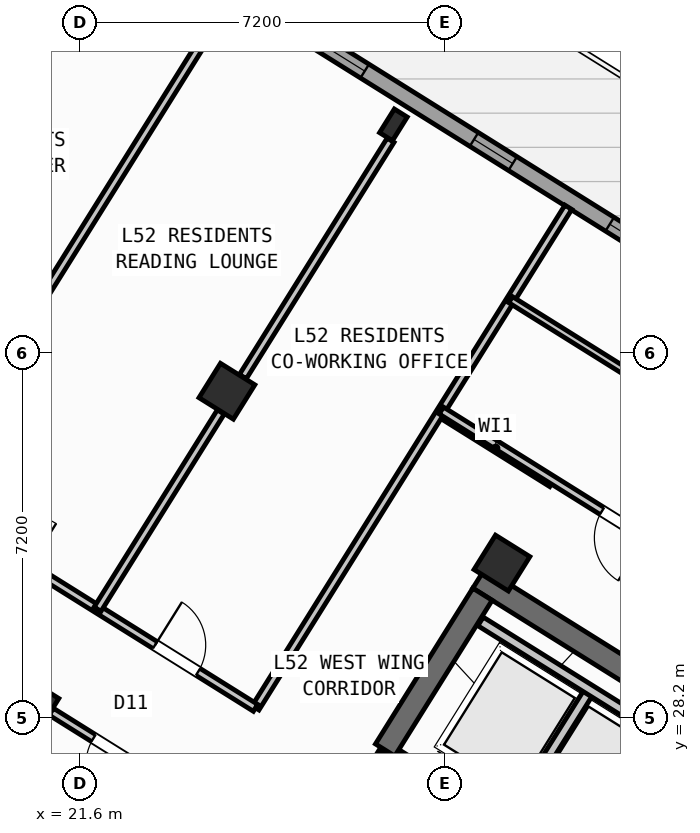
"""IFC4 building model, lengths in metres.
Left out: names, types, materials, properties, quantities, classifications, styles, units other than length and angle.
Written with IfcOpenShell. Run it as: python <this file> out.ifc"""

import sys

from ifc_helpers import new_model, si_unit, direction, frame, frame_2d, origin, origin_2d, place, context, subcontext, project, spatial, rectangle, hollow_rectangle, i_section, extrude, source, transform, mapped, element, fill, save


model = new_model("IFC4")
c1 = context("Model", 3, precision=1e-05, world=origin(), true_north=direction((0.0, 1.0)))
c2 = subcontext(c1, "Body", "Model", "MODEL_VIEW")
j1 = project(units=[si_unit("LENGTHUNIT", "METRE"), si_unit("PLANEANGLEUNIT", "RADIAN")], contexts=[c1])
p1 = place(None, origin())
s1 = spatial("IfcSite", under=j1, at=p1, CompositionType="ELEMENT")
p2 = place(p1, origin())
s2 = spatial("IfcBuilding", under=s1, at=p2, CompositionType="ELEMENT")
p3 = place(p2, frame((0.0, 0.0, 207.6)))
s3 = spatial("IfcBuildingStorey", under=s2, at=p3, CompositionType="ELEMENT", Elevation=207.6)
p4 = place(p3, frame((40.531, 24.036, 0.0), z_axis=(0.0, 0.0, 1.0), x_axis=(-0.848048787466, 0.529918157905, 0.0)))
e1 = element("IfcWall", 1, at=p4, inside=s3, PredefinedType="SHEAR", context=c2, shape_type="SweptSolid", body=[
    extrude(rectangle(XDim=13.04, YDim=0.45, at=frame_2d((6.52, 0.0))), origin(), (0.0, 0.0, 1.0), 3.35),
])
p5 = place(p3, frame((29.544, 30.636, 0.0), z_axis=(0.0, 0.0, 1.0), x_axis=(-0.529902075036, -0.848058836916, 0.0)))
e2 = element("IfcWall", 2, at=p5, inside=s3, PredefinedType="SHEAR", context=c2, shape_type="SweptSolid", body=[
    extrude(rectangle(XDim=3.625, YDim=0.45, at=frame_2d((1.812, 0.0))), origin(), (0.0, 0.0, 1.0), 3.35),
])
m1 = source(origin(), c2, "Body", "SweptSolid", [
    extrude(hollow_rectangle(XDim=0.8, YDim=0.8, WallThickness=0.032, at=origin_2d()), origin(), (0.0, 0.0, 1.0), 3.6),
])
p6 = place(p3, frame((29.928, 31.251, 0.0), z_axis=(0.0, 0.0, 1.0), x_axis=(-0.848048096156, 0.529919264233, 0.0)))
e3 = element("IfcColumn", 3, at=p6, inside=s3, PredefinedType="COLUMN", context=c2, shape_type="MappedRepresentation", body=[
    mapped(m1, transform((0.0, 0.0, 0.0), scale=1.0)),
])
m2 = source(origin(), c2, "Body", "SweptSolid", [
    extrude(i_section(OverallWidth=0.3, OverallDepth=0.55, WebThickness=0.015, FlangeThickness=0.029, at=origin_2d()), origin(), (0.0, 0.0, 1.0), 3.6),
])
p7 = place(p3, frame((27.786, 39.901, 0.0), z_axis=(0.0, 0.0, 1.0), x_axis=(-0.848048096156, 0.529919264233, 0.0)))
e4 = element("IfcColumn", 4, at=p7, inside=s3, PredefinedType="COLUMN", context=c2, shape_type="MappedRepresentation", body=[
    mapped(m2, transform((0.0, 0.0, 0.0), scale=1.0)),
])
for number, where, z_axis, x_axis in (
    (5, (24.5, 34.643, 0.0), (0.0, 0.0, 1.0), (-0.848, 0.53, 0.0)),
    (6, (20.632, 28.452, 0.0), (0.0, 0.0, 1.0), (-0.848, 0.53, 0.0)),
):
    element("IfcColumn", number, at=place(p3, frame(where, z_axis=z_axis, x_axis=x_axis)), inside=s3, PredefinedType="COLUMN", context=c2, shape_type="MappedRepresentation", body=[
        mapped(m1, transform((0.0, 0.0, 0.0), scale=1.0)),
    ])
p8 = place(p3, frame((31.76, 12.183, 0.0), z_axis=(0.0, 0.0, 1.0), x_axis=(-0.848047074256, 0.529920899612, 0.0)))
e7 = element("IfcWall", 7, at=p8, inside=s3, PredefinedType="STANDARD", context=c2, shape_type="SweptSolid", body=[
    extrude(rectangle(XDim=30.652, YDim=0.32, at=frame_2d((15.326, 0.0))), origin(), (0.0, 0.0, 1.0), 3.35),
])
p9 = place(p8, frame((15.166, 0.0, 0.0)))
e8 = element("IfcOpeningElement", 8, at=p9, cuts=e7, PredefinedType="OPENING", context=c2, shape_type="SweptSolid", body=[
    extrude(rectangle(XDim=1.2, YDim=2.15, at=frame_2d((0.6, 1.075))), frame((0.0, 0.17, 0.0), z_axis=(0.0, -1.0, 0.0), x_axis=(1.0, 0.0, 0.0)), (0.0, 0.0, 1.0), 0.34),
])
p10 = place(p8, frame((2.24, 0.0, 0.9)))
e9 = element("IfcOpeningElement", 9, at=p10, cuts=e7, PredefinedType="OPENING", context=c2, shape_type="SweptSolid", body=[
    extrude(rectangle(XDim=1.65, YDim=1.45, at=frame_2d((0.825, 0.725))), frame((0.0, 0.17, 0.0), z_axis=(0.0, -1.0, 0.0), x_axis=(1.0, 0.0, 0.0)), (0.0, 0.0, 1.0), 0.34),
])
p11 = place(p8, frame((7.469, 0.0, 0.9)))
e10 = element("IfcOpeningElement", 10, at=p11, cuts=e7, PredefinedType="OPENING", context=c2, shape_type="SweptSolid", body=[
    extrude(rectangle(XDim=1.65, YDim=1.45, at=frame_2d((0.825, 0.725))), frame((0.0, 0.17, 0.0), z_axis=(0.0, -1.0, 0.0), x_axis=(1.0, 0.0, 0.0)), (0.0, 0.0, 1.0), 0.34),
])
p12 = place(p8, frame((12.623, 0.0, 1.0)))
e11 = element("IfcOpeningElement", 11, at=p12, cuts=e7, PredefinedType="OPENING", context=c2, shape_type="SweptSolid", body=[
    extrude(rectangle(XDim=0.9, YDim=1.25, at=frame_2d((0.45, 0.625))), frame((0.0, 0.17, 0.0), z_axis=(0.0, -1.0, 0.0), x_axis=(1.0, 0.0, 0.0)), (0.0, 0.0, 1.0), 0.34),
])
p13 = place(p8, frame((19.715, 0.0, 1.0)))
e12 = element("IfcOpeningElement", 12, at=p13, cuts=e7, PredefinedType="OPENING", context=c2, shape_type="SweptSolid", body=[
    extrude(rectangle(XDim=0.9, YDim=1.25, at=frame_2d((0.45, 0.625))), frame((0.0, 0.17, 0.0), z_axis=(0.0, -1.0, 0.0), x_axis=(1.0, 0.0, 0.0)), (0.0, 0.0, 1.0), 0.34),
])
p14 = place(p8, frame((25.566, 0.0, 0.9)))
e13 = element("IfcOpeningElement", 13, at=p14, cuts=e7, PredefinedType="OPENING", context=c2, shape_type="SweptSolid", body=[
    extrude(rectangle(XDim=1.65, YDim=1.45, at=frame_2d((0.825, 0.725))), frame((0.0, 0.17, 0.0), z_axis=(0.0, -1.0, 0.0), x_axis=(1.0, 0.0, 0.0)), (0.0, 0.0, 1.0), 0.34),
])
p15 = place(p8, frame((28.896, 0.0, 1.0)))
e14 = element("IfcOpeningElement", 14, at=p15, cuts=e7, PredefinedType="OPENING", context=c2, shape_type="SweptSolid", body=[
    extrude(rectangle(XDim=0.9, YDim=1.25, at=frame_2d((0.45, 0.625))), frame((0.0, 0.17, 0.0), z_axis=(0.0, -1.0, 0.0), x_axis=(1.0, 0.0, 0.0)), (0.0, 0.0, 1.0), 0.34),
])
p16 = place(p3, frame((17.424, 47.083, 0.0), z_axis=(0.0, 0.0, 1.0), x_axis=(0.848049927979, -0.529916332693, 0.0)))
e15 = element("IfcWall", 15, at=p16, inside=s3, PredefinedType="STANDARD", context=c2, shape_type="SweptSolid", body=[
    extrude(rectangle(XDim=29.223, YDim=0.32, at=frame_2d((14.612, 0.0))), origin(), (0.0, 0.0, 1.0), 3.35),
])
p17 = place(p16, frame((2.526, 0.0, 0.0)))
e16 = element("IfcOpeningElement", 16, at=p17, cuts=e15, PredefinedType="OPENING", context=c2, shape_type="SweptSolid", body=[
    extrude(rectangle(XDim=1.05, YDim=2.15, at=frame_2d((0.525, 1.075))), frame((0.0, 0.17, 0.0), z_axis=(0.0, -1.0, 0.0), x_axis=(1.0, 0.0, 0.0)), (0.0, 0.0, 1.0), 0.34),
])
p18 = place(p16, frame((0.653, 0.0, 0.9)))
e17 = element("IfcOpeningElement", 17, at=p18, cuts=e15, PredefinedType="OPENING", context=c2, shape_type="SweptSolid", body=[
    extrude(rectangle(XDim=1.35, YDim=1.45, at=frame_2d((0.675, 0.725))), frame((0.0, 0.17, 0.0), z_axis=(0.0, -1.0, 0.0), x_axis=(1.0, 0.0, 0.0)), (0.0, 0.0, 1.0), 0.34),
])
p19 = place(p16, frame((6.897, 0.0, 1.0)))
e18 = element("IfcOpeningElement", 18, at=p19, cuts=e15, PredefinedType="OPENING", context=c2, shape_type="SweptSolid", body=[
    extrude(rectangle(XDim=0.9, YDim=1.25, at=frame_2d((0.45, 0.625))), frame((0.0, 0.17, 0.0), z_axis=(0.0, -1.0, 0.0), x_axis=(1.0, 0.0, 0.0)), (0.0, 0.0, 1.0), 0.34),
])
p20 = place(p16, frame((9.602, 0.0, 0.95)))
e19 = element("IfcOpeningElement", 19, at=p20, cuts=e15, PredefinedType="OPENING", context=c2, shape_type="SweptSolid", body=[
    extrude(rectangle(XDim=1.95, YDim=1.35, at=frame_2d((0.975, 0.675))), frame((0.0, 0.17, 0.0), z_axis=(0.0, -1.0, 0.0), x_axis=(1.0, 0.0, 0.0)), (0.0, 0.0, 1.0), 0.34),
])
p21 = place(p16, frame((14.096, 0.0, 1.0)))
e20 = element("IfcOpeningElement", 20, at=p21, cuts=e15, PredefinedType="OPENING", context=c2, shape_type="SweptSolid", body=[
    extrude(rectangle(XDim=0.9, YDim=1.25, at=frame_2d((0.45, 0.625))), frame((0.0, 0.17, 0.0), z_axis=(0.0, -1.0, 0.0), x_axis=(1.0, 0.0, 0.0)), (0.0, 0.0, 1.0), 0.34),
])
p22 = place(p16, frame((17.254, 0.0, 1.0)))
e21 = element("IfcOpeningElement", 21, at=p22, cuts=e15, PredefinedType="OPENING", context=c2, shape_type="SweptSolid", body=[
    extrude(rectangle(XDim=0.9, YDim=1.25, at=frame_2d((0.45, 0.625))), frame((0.0, 0.17, 0.0), z_axis=(0.0, -1.0, 0.0), x_axis=(1.0, 0.0, 0.0)), (0.0, 0.0, 1.0), 0.34),
])
p23 = place(p16, frame((21.139, 0.0, 0.9)))
e22 = element("IfcOpeningElement", 22, at=p23, cuts=e15, PredefinedType="OPENING", context=c2, shape_type="SweptSolid", body=[
    extrude(rectangle(XDim=1.35, YDim=1.45, at=frame_2d((0.675, 0.725))), frame((0.0, 0.17, 0.0), z_axis=(0.0, -1.0, 0.0), x_axis=(1.0, 0.0, 0.0)), (0.0, 0.0, 1.0), 0.34),
])
p24 = place(p16, frame((25.778, 0.0, 0.9)))
e23 = element("IfcOpeningElement", 23, at=p24, cuts=e15, PredefinedType="OPENING", context=c2, shape_type="SweptSolid", body=[
    extrude(rectangle(XDim=1.35, YDim=1.45, at=frame_2d((0.675, 0.725))), frame((0.0, 0.17, 0.0), z_axis=(0.0, -1.0, 0.0), x_axis=(1.0, 0.0, 0.0)), (0.0, 0.0, 1.0), 0.34),
])
p25 = place(p3, frame((33.496, 27.677, 0.0), z_axis=(0.0, 0.0, 1.0), x_axis=(-0.529908658664, -0.84805472316, 0.0)))
e24 = element("IfcWall", 24, at=p25, inside=s3, PredefinedType="SHEAR", context=c2, shape_type="SweptSolid", body=[
    extrude(rectangle(XDim=3.16, YDim=0.26, at=frame_2d((1.58, 0.0))), origin(), (0.0, 0.0, 1.0), 3.35),
])
p26 = place(p3, frame((31.822, 24.998, 0.0), z_axis=(0.0, 0.0, 1.0), x_axis=(-0.848054125777, 0.529909614701, 0.0)))
e25 = element("IfcWall", 25, at=p26, inside=s3, PredefinedType="STANDARD", context=c2, shape_type="SweptSolid", body=[
    extrude(rectangle(XDim=4.668, YDim=0.2, at=frame_2d((2.334, 0.0))), origin(), (0.0, 0.0, 1.0), 3.34),
])
p27 = place(p26, frame((0.52, 0.0, 0.0)))
e26 = element("IfcOpeningElement", 26, at=p27, cuts=e25, PredefinedType="OPENING", context=c2, shape_type="SweptSolid", body=[
    extrude(rectangle(XDim=1.2, YDim=2.15, at=frame_2d((0.6, 1.075))), frame((0.0, 0.11, 0.0), z_axis=(0.0, -1.0, 0.0), x_axis=(1.0, 0.0, 0.0)), (0.0, 0.0, 1.0), 0.22),
])
p28 = place(p26, frame((2.54, 0.0, 0.0)))
e27 = element("IfcOpeningElement", 27, at=p28, cuts=e25, PredefinedType="OPENING", context=c2, shape_type="SweptSolid", body=[
    extrude(rectangle(XDim=1.2, YDim=2.15, at=frame_2d((0.6, 1.075))), frame((0.0, 0.11, 0.0), z_axis=(0.0, -1.0, 0.0), x_axis=(1.0, 0.0, 0.0)), (0.0, 0.0, 1.0), 0.22),
])
p29 = place(p3, frame((31.645, 28.716, 0.0), z_axis=(0.0, 0.0, 1.0), x_axis=(-0.52986693015, -0.848080795876, 0.0)))
e28 = element("IfcWall", 28, at=p29, inside=s3, PredefinedType="STANDARD", context=c2, shape_type="SweptSolid", body=[
    extrude(rectangle(XDim=2.66, YDim=0.2, at=frame_2d((1.33, 0.0))), origin(), (0.0, 0.0, 1.0), 3.34),
])
p30 = place(p3, frame((33.363, 27.69, 0.0), z_axis=(0.0, 0.0, 1.0), x_axis=(-0.84804957148, 0.529916903215, 0.0)))
e29 = element("IfcWall", 29, at=p30, inside=s3, PredefinedType="STANDARD", context=c2, shape_type="SweptSolid", body=[
    extrude(rectangle(XDim=4.548, YDim=0.2, at=frame_2d((2.274, 0.0))), origin(), (0.0, 0.0, 1.0), 3.34),
])
p31 = place(p3, frame((27.596, 27.52, 0.0), z_axis=(0.0, 0.0, 1.0), x_axis=(-0.529865479138, -0.848081702443, 0.0)))
e30 = element("IfcWall", 30, at=p31, inside=s3, PredefinedType="STANDARD", context=c2, shape_type="SweptSolid", body=[
    extrude(rectangle(XDim=2.96, YDim=0.2, at=frame_2d((1.48, 0.0))), origin(), (0.0, 0.0, 1.0), 3.34),
])
p32 = place(p31, frame((0.7, 0.0, 0.0)))
e31 = element("IfcOpeningElement", 31, at=p32, cuts=e30, PredefinedType="OPENING", context=c2, shape_type="SweptSolid", body=[
    extrude(rectangle(XDim=1.5, YDim=2.15, at=frame_2d((0.75, 1.075))), frame((0.0, 0.11, 0.0), z_axis=(0.0, -1.0, 0.0), x_axis=(1.0, 0.0, 0.0)), (0.0, 0.0, 1.0), 0.22),
])
p33 = place(p3, frame((30.914, 32.829, 0.0), z_axis=(0.0, 0.0, 1.0), x_axis=(-0.848008813643, 0.529982124211, 0.0)))
e32 = element("IfcWall", 32, at=p33, inside=s3, PredefinedType="PARTITIONING", context=c2, shape_type="SweptSolid", body=[
    extrude(rectangle(XDim=2.61, YDim=0.16, at=frame_2d((1.305, 0.0))), origin(), (0.0, 0.0, 1.0), 3.34),
])
p34 = place(p3, frame((31.239, 38.274, 0.0), z_axis=(0.0, 0.0, 1.0), x_axis=(-0.529925472745, -0.848044216616, 0.0)))
e33 = element("IfcWall", 33, at=p34, inside=s3, PredefinedType="PARTITIONING", context=c2, shape_type="SweptSolid", body=[
    extrude(rectangle(XDim=11.65, YDim=0.16, at=frame_2d((5.825, 0.0))), origin(), (0.0, 0.0, 1.0), 3.34),
])
p35 = place(p3, frame((25.065, 28.394, 0.0), z_axis=(0.0, 0.0, 1.0), x_axis=(-0.848048310262, 0.529918921593, 0.0)))
e34 = element("IfcWall", 34, at=p35, inside=s3, PredefinedType="PARTITIONING", context=c2, shape_type="SweptSolid", body=[
    extrude(rectangle(XDim=16.73, YDim=0.16, at=frame_2d((8.365, 0.0))), origin(), (0.0, 0.0, 1.0), 3.34),
])
p36 = place(p35, frame((1.338, 0.0, 0.0)))
e35 = element("IfcOpeningElement", 35, at=p36, cuts=e34, PredefinedType="OPENING", context=c2, shape_type="SweptSolid", body=[
    extrude(rectangle(XDim=1.0, YDim=2.1, at=frame_2d((0.5, 1.05))), frame((0.0, 0.09, 0.0), z_axis=(0.0, -1.0, 0.0), x_axis=(1.0, 0.0, 0.0)), (0.0, 0.0, 1.0), 0.18),
])
p37 = place(p35, frame((5.265, 0.0, 0.0)))
e36 = element("IfcOpeningElement", 36, at=p37, cuts=e34, PredefinedType="OPENING", context=c2, shape_type="SweptSolid", body=[
    extrude(rectangle(XDim=1.0, YDim=2.1, at=frame_2d((0.5, 1.05))), frame((0.0, 0.09, 0.0), z_axis=(0.0, -1.0, 0.0), x_axis=(1.0, 0.0, 0.0)), (0.0, 0.0, 1.0), 0.18),
])
p38 = place(p35, frame((9.526, 0.0, 0.0)))
e37 = element("IfcOpeningElement", 37, at=p38, cuts=e34, PredefinedType="OPENING", context=c2, shape_type="SweptSolid", body=[
    extrude(rectangle(XDim=1.0, YDim=2.1, at=frame_2d((0.5, 1.05))), frame((0.0, 0.09, 0.0), z_axis=(0.0, -1.0, 0.0), x_axis=(1.0, 0.0, 0.0)), (0.0, 0.0, 1.0), 0.18),
])
p39 = place(p35, frame((13.954, 0.0, 0.0)))
e38 = element("IfcOpeningElement", 38, at=p39, cuts=e34, PredefinedType="OPENING", context=c2, shape_type="SweptSolid", body=[
    extrude(rectangle(XDim=1.0, YDim=2.1, at=frame_2d((0.5, 1.05))), frame((0.0, 0.09, 0.0), z_axis=(0.0, -1.0, 0.0), x_axis=(1.0, 0.0, 0.0)), (0.0, 0.0, 1.0), 0.18),
])
p40 = place(p3, frame((23.899, 26.529, 0.0), z_axis=(0.0, 0.0, 1.0), x_axis=(-0.848055143312, 0.529907986259, 0.0)))
e39 = element("IfcWall", 39, at=p40, inside=s3, PredefinedType="PARTITIONING", context=c2, shape_type="SweptSolid", body=[
    extrude(rectangle(XDim=3.378, YDim=0.16, at=frame_2d((1.689, 0.0))), origin(), (0.0, 0.0, 1.0), 2.825),
])
p41 = place(p40, frame((1.395, 0.0, 0.0)))
e40 = element("IfcOpeningElement", 40, at=p41, cuts=e39, PredefinedType="OPENING", context=c2, shape_type="SweptSolid", body=[
    extrude(rectangle(XDim=1.0, YDim=2.1, at=frame_2d((0.5, 1.05))), frame((0.0, 0.09, 0.0), z_axis=(0.0, -1.0, 0.0), x_axis=(1.0, 0.0, 0.0)), (0.0, 0.0, 1.0), 0.18),
])
p42 = place(p3, frame((27.73, 39.597, 0.0), z_axis=(0.0, 0.0, 1.0), x_axis=(-0.529919150083, -0.848048167486, 0.0)))
e41 = element("IfcWall", 41, at=p42, inside=s3, PredefinedType="PARTITIONING", context=c2, shape_type="SweptSolid", body=[
    extrude(rectangle(XDim=5.501, YDim=0.16, at=frame_2d((2.75, 0.0))), origin(), (0.0, 0.0, 1.0), 2.825),
])
p43 = place(p3, frame((24.379, 34.233, 0.0), z_axis=(0.0, 0.0, 1.0), x_axis=(-0.529922402838, -0.84804613493, 0.0)))
e42 = element("IfcWall", 42, at=p43, inside=s3, PredefinedType="PARTITIONING", context=c2, shape_type="SweptSolid", body=[
    extrude(rectangle(XDim=4.588, YDim=0.16, at=frame_2d((2.294, 0.0))), origin(), (0.0, 0.0, 1.0), 2.825),
])
p44 = place(p3, frame((24.578, 42.436, 0.0), z_axis=(0.0, 0.0, 1.0), x_axis=(-0.529916055051, -0.848050101468, 0.0)))
e43 = element("IfcWall", 43, at=p44, inside=s3, PredefinedType="PARTITIONING", context=c2, shape_type="SweptSolid", body=[
    extrude(rectangle(XDim=11.65, YDim=0.16, at=frame_2d((5.825, 0.0))), origin(), (0.0, 0.0, 1.0), 2.995),
])
p45 = place(p3, frame((41.936, 26.012, 0.0), z_axis=(0.0, 0.0, 1.0), x_axis=(-0.848051154596, 0.529914369676, 0.0)))
e44 = element("IfcWall", 44, at=p45, inside=s3, PredefinedType="PARTITIONING", context=c2, shape_type="SweptSolid", body=[
    extrude(rectangle(XDim=15.57, YDim=0.16, at=frame_2d((7.785, 0.0))), origin(), (0.0, 0.0, 1.0), 3.34),
])
p46 = place(p45, frame((10.83, 0.0, 0.0)))
e45 = element("IfcOpeningElement", 45, at=p46, cuts=e44, PredefinedType="OPENING", context=c2, shape_type="SweptSolid", body=[
    extrude(rectangle(XDim=1.0, YDim=2.1, at=frame_2d((0.5, 1.05))), frame((0.0, 0.09, 0.0), z_axis=(0.0, -1.0, 0.0), x_axis=(1.0, 0.0, 0.0)), (0.0, 0.0, 1.0), 0.18),
])
p47 = place(p3, frame((42.226, 28.873, 0.0), z_axis=(0.0, 0.0, 1.0), x_axis=(-0.848049134363, 0.529917602752, 0.0)))
e46 = element("IfcWall", 46, at=p47, inside=s3, PredefinedType="PLUMBINGWALL", context=c2, shape_type="SweptSolid", body=[
    extrude(rectangle(XDim=14.3, YDim=0.14, at=frame_2d((7.15, 0.0))), origin(), (0.0, 0.0, 1.0), 3.34),
])
p48 = place(p47, frame((9.57, 0.0, 0.0)))
e47 = element("IfcOpeningElement", 47, at=p48, cuts=e46, PredefinedType="OPENING", context=c2, shape_type="SweptSolid", body=[
    extrude(rectangle(XDim=0.92, YDim=2.08, at=frame_2d((0.46, 1.04))), frame((0.0, 0.08, 0.0), z_axis=(0.0, -1.0, 0.0), x_axis=(1.0, 0.0, 0.0)), (0.0, 0.0, 1.0), 0.16),
])
m3 = source(origin(), c2, "Body", "SweptSolid", [
    extrude(rectangle(XDim=1.95, YDim=1.35, at=frame_2d((0.975, 0.675))), frame((0.0, 0.03, 0.0), z_axis=(0.0, -1.0, 0.0), x_axis=(1.0, 0.0, 0.0)), (0.0, 0.0, 1.0), 0.06),
])
p49 = place(p20, origin())
e48 = element("IfcWindow", 48, at=p49, inside=s3, PartitioningType="SINGLE_PANEL", PredefinedType="WINDOW", context=c2, shape_type="MappedRepresentation", body=[
    mapped(m3, transform((0.0, 0.0, 0.0), scale=1.0)),
])
fill(e19, e48)
m4 = source(origin(), c2, "Body", "SweptSolid", [
    extrude(rectangle(XDim=0.9, YDim=1.25, at=frame_2d((0.45, 0.625))), frame((0.0, 0.03, 0.0), z_axis=(0.0, -1.0, 0.0), x_axis=(1.0, 0.0, 0.0)), (0.0, 0.0, 1.0), 0.06),
])
p50 = place(p21, origin())
e49 = element("IfcWindow", 49, at=p50, inside=s3, PartitioningType="SINGLE_PANEL", PredefinedType="WINDOW", context=c2, shape_type="MappedRepresentation", body=[
    mapped(m4, transform((0.0, 0.0, 0.0), scale=1.0)),
])
fill(e20, e49)
p51 = place(p22, origin())
e50 = element("IfcWindow", 50, at=p51, inside=s3, PartitioningType="SINGLE_PANEL", PredefinedType="WINDOW", context=c2, shape_type="MappedRepresentation", body=[
    mapped(m4, transform((0.0, 0.0, 0.0), scale=1.0)),
])
fill(e21, e50)
m5 = source(origin(), c2, "Body", "SweptSolid", [
    extrude(rectangle(XDim=1.0, YDim=2.1, at=frame_2d((0.5, 1.05))), frame((0.0, 0.025, 0.0), z_axis=(0.0, -1.0, 0.0), x_axis=(1.0, 0.0, 0.0)), (0.0, 0.0, 1.0), 0.05),
])
p52 = place(p41, origin())
e51 = element("IfcDoor", 51, at=p52, inside=s3, OperationType="SINGLE_SWING_LEFT", PredefinedType="DOOR", context=c2, shape_type="MappedRepresentation", body=[
    mapped(m5, transform((0.0, 0.0, 0.0), scale=1.0)),
])
fill(e40, e51)
p53 = place(p36, frame((1.0, 0.0, 0.0), z_axis=(0.0, 0.0, 1.0), x_axis=(-1.0, 0.0, 0.0)))
e52 = element("IfcDoor", 52, at=p53, inside=s3, OperationType="SINGLE_SWING_LEFT", PredefinedType="DOOR", context=c2, shape_type="MappedRepresentation", body=[
    mapped(m5, transform((0.0, 0.0, 0.0), scale=1.0)),
])
fill(e35, e52)
p54 = place(p46, origin())
e53 = element("IfcDoor", 53, at=p54, inside=s3, OperationType="SINGLE_SWING_LEFT", PredefinedType="DOOR", context=c2, shape_type="MappedRepresentation", body=[
    mapped(m5, transform((0.0, 0.0, 0.0), scale=1.0)),
])
fill(e45, e53)
save(model, sys.argv[1])
